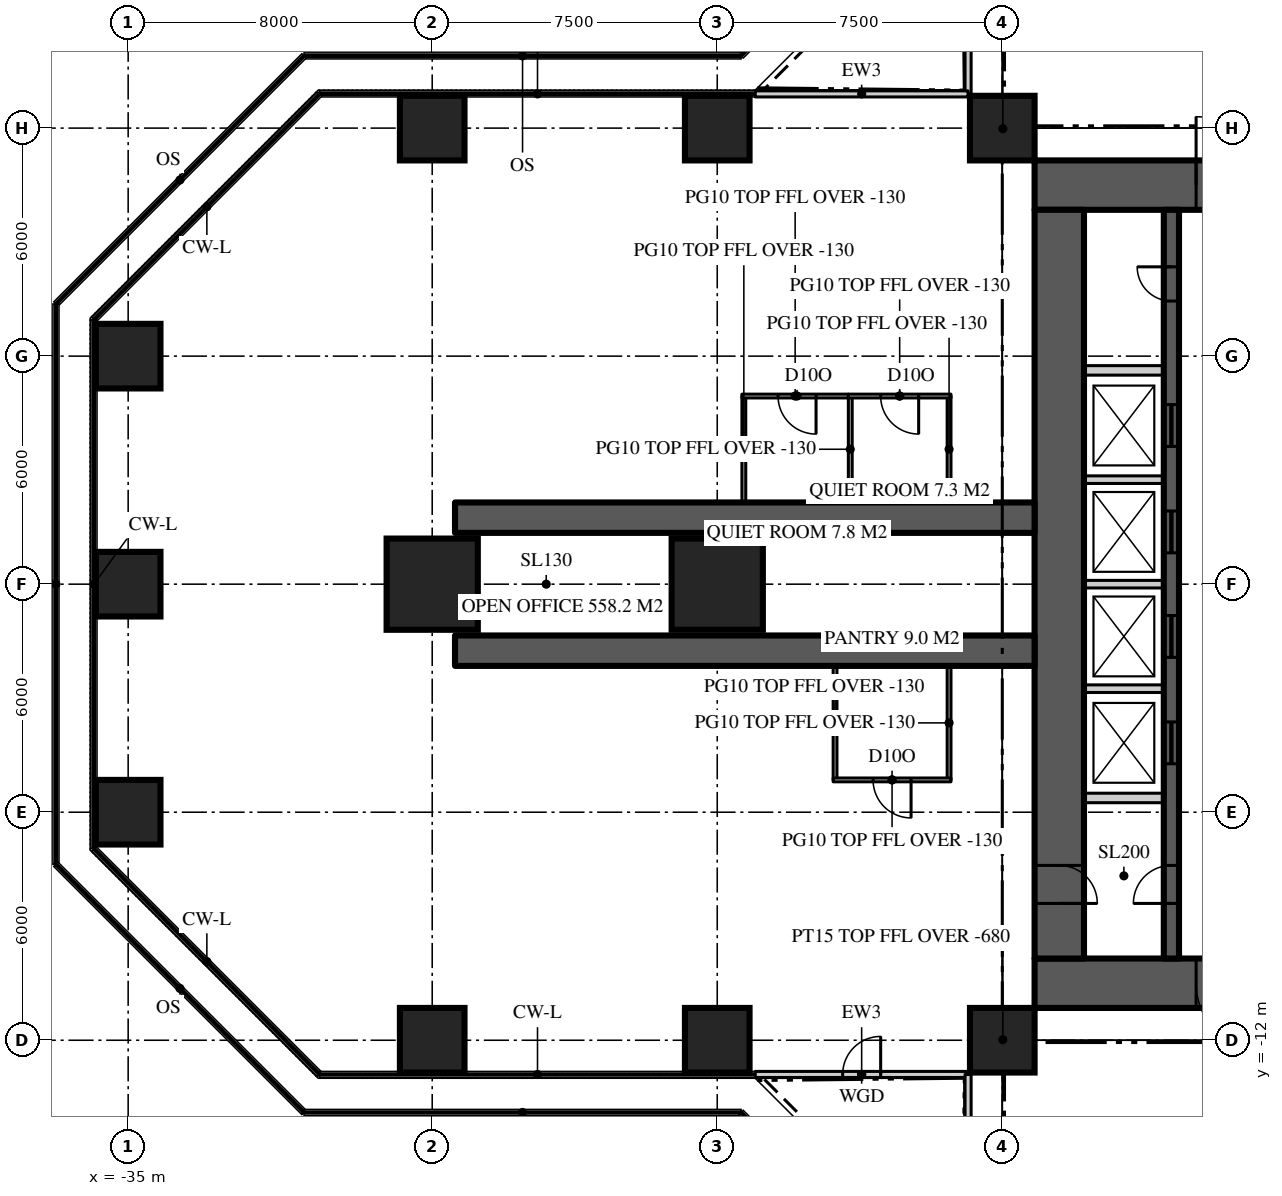
"""IFC4 building model, lengths in metres.
Left out: names, types, materials, properties, quantities, classifications, styles, units other than length and angle.
Written with IfcOpenShell. Run it as: python <this file> out.ifc"""

import sys

from ifc_helpers import new_model, si_unit, direction, frame, frame_2d, origin, origin_2d, place, context, subcontext, project, spatial, rectangle, extrude, element, fill, save


model = new_model("IFC4")
c1 = context("Model", 3, precision=1e-05, world=origin(), true_north=direction((0.0, 1.0)))
c2 = subcontext(c1, "Body", "Model", "MODEL_VIEW")
j1 = project(units=[si_unit("LENGTHUNIT", "METRE"), si_unit("PLANEANGLEUNIT", "RADIAN")], contexts=[c1])
p1 = place(None, origin())
s1 = spatial("IfcSite", under=j1, at=p1, CompositionType="ELEMENT")
p2 = place(p1, origin())
s2 = spatial("IfcBuilding", under=s1, at=p2, CompositionType="ELEMENT")
p3 = place(p2, frame((0.0, 0.0, 98.1)))
s3 = spatial("IfcBuildingStorey", under=s2, at=p3, CompositionType="ELEMENT", Elevation=98.1)
p4 = place(p3, frame((-11.15, 10.5, 0.0), z_axis=(0.0, 0.0, 1.0), x_axis=(1.0, 0.0, 0.0)))
e1 = element("IfcWall", 1, at=p4, inside=s3, PredefinedType="SHEAR", context=c2, shape_type="SweptSolid", body=[
    extrude(rectangle(XDim=22.3, YDim=1.3, at=frame_2d((11.15, 0.0))), origin(), (0.0, 0.0, 1.0), 3.9),
])
p5 = place(p4, frame((4.25, 0.0, 0.0)))
e2 = element("IfcOpeningElement", 2, at=p5, cuts=e1, PredefinedType="OPENING", context=c2, shape_type="SweptSolid", body=[
    extrude(rectangle(XDim=1.8, YDim=2.2, at=frame_2d((0.9, 1.1))), frame((0.0, 0.66, 0.0), z_axis=(0.0, -1.0, 0.0), x_axis=(1.0, 0.0, 0.0)), (0.0, 0.0, 1.0), 1.32),
])
p6 = place(p4, frame((16.25, 0.0, 0.0)))
e3 = element("IfcOpeningElement", 3, at=p6, cuts=e1, PredefinedType="OPENING", context=c2, shape_type="SweptSolid", body=[
    extrude(rectangle(XDim=1.8, YDim=2.2, at=frame_2d((0.9, 1.1))), frame((0.0, 0.66, 0.0), z_axis=(0.0, -1.0, 0.0), x_axis=(1.0, 0.0, 0.0)), (0.0, 0.0, 1.0), 1.32),
])
p7 = place(p3, frame((11.15, -10.5, 0.0), z_axis=(0.0, 0.0, 1.0), x_axis=(-1.0, 0.0, 0.0)))
e4 = element("IfcWall", 4, at=p7, inside=s3, PredefinedType="SHEAR", context=c2, shape_type="SweptSolid", body=[
    extrude(rectangle(XDim=22.3, YDim=1.3, at=frame_2d((11.15, 0.0))), origin(), (0.0, 0.0, 1.0), 3.9),
])
p8 = place(p7, frame((16.25, 0.0, 0.0)))
e5 = element("IfcOpeningElement", 5, at=p8, cuts=e4, PredefinedType="OPENING", context=c2, shape_type="SweptSolid", body=[
    extrude(rectangle(XDim=1.8, YDim=2.2, at=frame_2d((0.9, 1.1))), frame((0.0, 0.66, 0.0), z_axis=(0.0, -1.0, 0.0), x_axis=(1.0, 0.0, 0.0)), (0.0, 0.0, 1.0), 1.32),
])
p9 = place(p7, frame((4.25, 0.0, 0.0)))
e6 = element("IfcOpeningElement", 6, at=p9, cuts=e4, PredefinedType="OPENING", context=c2, shape_type="SweptSolid", body=[
    extrude(rectangle(XDim=1.8, YDim=2.2, at=frame_2d((0.9, 1.1))), frame((0.0, 0.66, 0.0), z_axis=(0.0, -1.0, 0.0), x_axis=(1.0, 0.0, 0.0)), (0.0, 0.0, 1.0), 1.32),
])
p10 = place(p3, frame((-10.5, 9.85, 0.0), z_axis=(0.0, 0.0, 1.0), x_axis=(0.0, -1.0, 0.0)))
e7 = element("IfcWall", 7, at=p10, inside=s3, PredefinedType="SHEAR", context=c2, shape_type="SweptSolid", body=[
    extrude(rectangle(XDim=19.7, YDim=1.3, at=frame_2d((9.85, 0.0))), origin(), (0.0, 0.0, 1.0), 3.9),
])
p11 = place(p10, frame((17.25, 0.0, 0.0)))
e8 = element("IfcOpeningElement", 8, at=p11, cuts=e7, PredefinedType="OPENING", context=c2, shape_type="SweptSolid", body=[
    extrude(rectangle(XDim=1.0, YDim=2.2, at=frame_2d((0.5, 1.1))), frame((0.0, 0.66, 0.0), z_axis=(0.0, -1.0, 0.0), x_axis=(1.0, 0.0, 0.0)), (0.0, 0.0, 1.0), 1.32),
])
for number, where, z_axis, x_axis in (
    (9, (-11.15, 1.75, 0.0), (0.0, 0.0, 1.0), (-1.0, 0.0, 0.0)),
    (10, (-11.15, -1.75, 0.0), (0.0, 0.0, 1.0), (-1.0, 0.0, 0.0)),
):
    element("IfcWall", number, at=place(p3, frame(where, z_axis=z_axis, x_axis=x_axis)), inside=s3, PredefinedType="SHEAR", context=c2, shape_type="SweptSolid", body=[
        extrude(rectangle(XDim=15.25, YDim=0.8, at=frame_2d((7.625, 0.0))), origin(), (0.0, 0.0, 1.0), 3.9),
    ])
for number, where, z_axis, x_axis in (
    (11, (-27.0, -12.0, 0.0), (0.0, 0.0, 1.0), (1.0, 0.0, 0.0)),
    (12, (-19.5, -12.0, 0.0), (0.0, 0.0, 1.0), (1.0, 0.0, 0.0)),
    (13, (-12.0, -12.0, 0.0), (0.0, 0.0, 1.0), (1.0, 0.0, 0.0)),
    (14, (-35.0, -6.0, 0.0), (0.0, 0.0, 1.0), (1.0, 0.0, 0.0)),
    (15, (-35.0, 0.0, 0.0), (0.0, 0.0, 1.0), (1.0, 0.0, 0.0)),
):
    element("IfcColumn", number, at=place(p3, frame(where, z_axis=z_axis, x_axis=x_axis)), inside=s3, PredefinedType="COLUMN", context=c2, shape_type="SweptSolid", body=[
        extrude(rectangle(XDim=1.7, YDim=1.7, at=origin_2d()), origin(), (0.0, 0.0, 1.0), 3.9),
    ])
for number, where, z_axis, x_axis in (
    (16, (-27.0, 0.0, 0.0), (0.0, 0.0, 1.0), (1.0, 0.0, 0.0)),
    (17, (-19.5, 0.0, 0.0), (0.0, 0.0, 1.0), (1.0, 0.0, 0.0)),
):
    element("IfcColumn", number, at=place(p3, frame(where, z_axis=z_axis, x_axis=x_axis)), inside=s3, PredefinedType="COLUMN", context=c2, shape_type="SweptSolid", body=[
        extrude(rectangle(XDim=2.4, YDim=2.4, at=origin_2d()), origin(), (0.0, 0.0, 1.0), 3.9),
    ])
for number, where, z_axis, x_axis in (
    (18, (-35.0, 6.0, 0.0), (0.0, 0.0, 1.0), (1.0, 0.0, 0.0)),
    (19, (-27.0, 12.0, 0.0), (0.0, 0.0, 1.0), (1.0, 0.0, 0.0)),
    (20, (-19.5, 12.0, 0.0), (0.0, 0.0, 1.0), (1.0, 0.0, 0.0)),
    (21, (-12.0, 12.0, 0.0), (0.0, 0.0, 1.0), (1.0, 0.0, 0.0)),
):
    element("IfcColumn", number, at=place(p3, frame(where, z_axis=z_axis, x_axis=x_axis)), inside=s3, PredefinedType="COLUMN", context=c2, shape_type="SweptSolid", body=[
        extrude(rectangle(XDim=1.7, YDim=1.7, at=origin_2d()), origin(), (0.0, 0.0, 1.0), 3.9),
    ])
p12 = place(p3, frame((-12.9, 18.5, 0.0), z_axis=(0.0, 0.0, 1.0), x_axis=(0.0, -1.0, 0.0)))
e22 = element("IfcWall", 22, at=p12, inside=s3, PredefinedType="SOLIDWALL", context=c2, shape_type="SweptSolid", body=[
    extrude(rectangle(XDim=5.6, YDim=0.16, at=frame_2d((2.8, 0.0))), origin(), (0.0, 0.0, 1.0), 3.77),
])
p13 = place(p12, frame((2.3, 0.0, 0.0)))
e23 = element("IfcOpeningElement", 23, at=p13, cuts=e22, PredefinedType="OPENING", context=c2, shape_type="SweptSolid", body=[
    extrude(rectangle(XDim=1.0, YDim=2.2, at=frame_2d((0.5, 1.1))), frame((0.0, 0.09, 0.0), z_axis=(0.0, -1.0, 0.0), x_axis=(1.0, 0.0, 0.0)), (0.0, 0.0, 1.0), 0.18),
])
p14 = place(p3, frame((-12.9, 12.9, 0.0), z_axis=(0.0, 0.0, 1.0), x_axis=(-1.0, 0.0, 0.0)))
e24 = element("IfcWall", 24, at=p14, inside=s3, PredefinedType="SOLIDWALL", context=c2, shape_type="SweptSolid", body=[
    extrude(rectangle(XDim=5.6, YDim=0.16, at=frame_2d((2.8, 0.0))), origin(), (0.0, 0.0, 1.0), 3.77),
])
p15 = place(p3, frame((-18.5, -12.9, 0.0), z_axis=(0.0, 0.0, 1.0), x_axis=(1.0, 0.0, 0.0)))
e25 = element("IfcWall", 25, at=p15, inside=s3, PredefinedType="SOLIDWALL", context=c2, shape_type="SweptSolid", body=[
    extrude(rectangle(XDim=5.6, YDim=0.16, at=frame_2d((2.8, 0.0))), origin(), (0.0, 0.0, 1.0), 3.77),
])
p16 = place(p15, frame((2.3, 0.0, 0.0)))
e26 = element("IfcOpeningElement", 26, at=p16, cuts=e25, PredefinedType="OPENING", context=c2, shape_type="SweptSolid", body=[
    extrude(rectangle(XDim=1.0, YDim=2.2, at=frame_2d((0.5, 1.1))), frame((0.0, 0.09, 0.0), z_axis=(0.0, -1.0, 0.0), x_axis=(1.0, 0.0, 0.0)), (0.0, 0.0, 1.0), 0.18),
])
p17 = place(p3, frame((-12.9, -12.9, 0.0), z_axis=(0.0, 0.0, 1.0), x_axis=(0.0, -1.0, 0.0)))
e27 = element("IfcWall", 27, at=p17, inside=s3, PredefinedType="SOLIDWALL", context=c2, shape_type="SweptSolid", body=[
    extrude(rectangle(XDim=5.6, YDim=0.16, at=frame_2d((2.8, 0.0))), origin(), (0.0, 0.0, 1.0), 3.77),
])
p18 = place(p3, frame((-7.55, -9.85, 0.0), z_axis=(0.0, 0.0, 1.0), x_axis=(0.0, 1.0, 0.0)))
e28 = element("IfcWall", 28, at=p18, inside=s3, PredefinedType="SHEAR", context=c2, shape_type="SweptSolid", body=[
    extrude(rectangle(XDim=19.7, YDim=0.4, at=frame_2d((9.85, 0.0))), origin(), (0.0, 0.0, 1.0), 3.9),
])
p19 = place(p18, frame((1.45, 0.0, 0.0)))
e29 = element("IfcOpeningElement", 29, at=p19, cuts=e28, PredefinedType="OPENING", context=c2, shape_type="SweptSolid", body=[
    extrude(rectangle(XDim=1.0, YDim=2.2, at=frame_2d((0.5, 1.1))), frame((0.0, 0.21, 0.0), z_axis=(0.0, -1.0, 0.0), x_axis=(1.0, 0.0, 0.0)), (0.0, 0.0, 1.0), 0.42),
])
p20 = place(p18, frame((17.3, 0.0, 0.0)))
e30 = element("IfcOpeningElement", 30, at=p20, cuts=e28, PredefinedType="OPENING", context=c2, shape_type="SweptSolid", body=[
    extrude(rectangle(XDim=0.9, YDim=2.1, at=frame_2d((0.45, 1.05))), frame((0.0, 0.21, 0.0), z_axis=(0.0, -1.0, 0.0), x_axis=(1.0, 0.0, 0.0)), (0.0, 0.0, 1.0), 0.42),
])
p21 = place(p18, frame((5.125, 0.0, 0.0)))
e31 = element("IfcOpeningElement", 31, at=p21, cuts=e28, PredefinedType="OPENING", context=c2, shape_type="SweptSolid", body=[
    extrude(rectangle(XDim=1.1, YDim=2.2, at=frame_2d((0.55, 1.1))), frame((0.0, 0.21, 0.0), z_axis=(0.0, -1.0, 0.0), x_axis=(1.0, 0.0, 0.0)), (0.0, 0.0, 1.0), 0.42),
])
p22 = place(p18, frame((7.925, 0.0, 0.0)))
e32 = element("IfcOpeningElement", 32, at=p22, cuts=e28, PredefinedType="OPENING", context=c2, shape_type="SweptSolid", body=[
    extrude(rectangle(XDim=1.1, YDim=2.2, at=frame_2d((0.55, 1.1))), frame((0.0, 0.21, 0.0), z_axis=(0.0, -1.0, 0.0), x_axis=(1.0, 0.0, 0.0)), (0.0, 0.0, 1.0), 0.42),
])
p23 = place(p18, frame((10.675, 0.0, 0.0)))
e33 = element("IfcOpeningElement", 33, at=p23, cuts=e28, PredefinedType="OPENING", context=c2, shape_type="SweptSolid", body=[
    extrude(rectangle(XDim=1.1, YDim=2.2, at=frame_2d((0.55, 1.1))), frame((0.0, 0.21, 0.0), z_axis=(0.0, -1.0, 0.0), x_axis=(1.0, 0.0, 0.0)), (0.0, 0.0, 1.0), 0.42),
])
p24 = place(p18, frame((13.475, 0.0, 0.0)))
e34 = element("IfcOpeningElement", 34, at=p24, cuts=e28, PredefinedType="OPENING", context=c2, shape_type="SweptSolid", body=[
    extrude(rectangle(XDim=1.1, YDim=2.2, at=frame_2d((0.55, 1.1))), frame((0.0, 0.21, 0.0), z_axis=(0.0, -1.0, 0.0), x_axis=(1.0, 0.0, 0.0)), (0.0, 0.0, 1.0), 0.42),
])
for number, where, z_axis, x_axis in (
    (35, (-9.85, 5.625, 0.0), (0.0, 0.0, 1.0), (1.0, 0.0, 0.0)),
    (36, (-9.85, -5.625, 0.0), (0.0, 0.0, 1.0), (1.0, 0.0, 0.0)),
):
    element("IfcWall", number, at=place(p3, frame(where, z_axis=z_axis, x_axis=x_axis)), inside=s3, PredefinedType="SOLIDWALL", context=c2, shape_type="SweptSolid", body=[
        extrude(rectangle(XDim=2.1, YDim=0.25, at=frame_2d((1.05, 0.0))), origin(), (0.0, 0.0, 1.0), 3.7),
    ])
for number, where, z_axis, x_axis in (
    (37, (-9.85, -2.75, 0.0), (0.0, 0.0, 1.0), (1.0, 0.0, 0.0)),
    (38, (-9.85, 0.0, 0.0), (0.0, 0.0, 1.0), (1.0, 0.0, 0.0)),
    (39, (-9.85, 2.75, 0.0), (0.0, 0.0, 1.0), (1.0, 0.0, 0.0)),
):
    element("IfcWall", number, at=place(p3, frame(where, z_axis=z_axis, x_axis=x_axis)), inside=s3, PredefinedType="SOLIDWALL", context=c2, shape_type="SweptSolid", body=[
        extrude(rectangle(XDim=2.1, YDim=0.2, at=frame_2d((1.05, 0.0))), origin(), (0.0, 0.0, 1.0), 3.7),
    ])
for number, where, z_axis, x_axis in (
    (40, (-13.4, -2.15, 0.0), (0.0, 0.0, 1.0), (0.0, -1.0, 0.0)),
    (41, (-16.4, -2.15, 0.0), (0.0, 0.0, 1.0), (0.0, -1.0, 0.0)),
):
    element("IfcWall", number, at=place(p3, frame(where, z_axis=z_axis, x_axis=x_axis)), inside=s3, PredefinedType="PARTITIONING", context=c2, shape_type="SweptSolid", body=[
        extrude(rectangle(XDim=3.0, YDim=0.1, at=frame_2d((1.5, 0.0))), origin(), (0.0, 0.0, 1.0), 3.77),
    ])
p25 = place(p3, frame((-13.35, -5.15, 0.0), z_axis=(0.0, 0.0, 1.0), x_axis=(-1.0, 0.0, 0.0)))
e42 = element("IfcWall", 42, at=p25, inside=s3, PredefinedType="PARTITIONING", context=c2, shape_type="SweptSolid", body=[
    extrude(rectangle(XDim=3.1, YDim=0.1, at=frame_2d((1.55, 0.0))), origin(), (0.0, 0.0, 1.0), 3.77),
])
p26 = place(p25, frame((1.05, 0.0, 0.0)))
e43 = element("IfcOpeningElement", 43, at=p26, cuts=e42, PredefinedType="OPENING", context=c2, shape_type="SweptSolid", body=[
    extrude(rectangle(XDim=1.0, YDim=2.2, at=frame_2d((0.5, 1.1))), frame((0.0, 0.06, 0.0), z_axis=(0.0, -1.0, 0.0), x_axis=(1.0, 0.0, 0.0)), (0.0, 0.0, 1.0), 0.12),
])
for number, where, z_axis, x_axis in (
    (44, (-13.4, 2.15, 0.0), (0.0, 0.0, 1.0), (0.0, 1.0, 0.0)),
    (45, (-16.0, 2.15, 0.0), (0.0, 0.0, 1.0), (0.0, 1.0, 0.0)),
):
    element("IfcWall", number, at=place(p3, frame(where, z_axis=z_axis, x_axis=x_axis)), inside=s3, PredefinedType="PARTITIONING", context=c2, shape_type="SweptSolid", body=[
        extrude(rectangle(XDim=2.8, YDim=0.1, at=frame_2d((1.4, 0.0))), origin(), (0.0, 0.0, 1.0), 3.77),
    ])
p27 = place(p3, frame((-13.35, 4.95, 0.0), z_axis=(0.0, 0.0, 1.0), x_axis=(-1.0, 0.0, 0.0)))
e46 = element("IfcWall", 46, at=p27, inside=s3, PredefinedType="PARTITIONING", context=c2, shape_type="SweptSolid", body=[
    extrude(rectangle(XDim=2.7, YDim=0.1, at=frame_2d((1.35, 0.0))), origin(), (0.0, 0.0, 1.0), 3.77),
])
p28 = place(p27, frame((0.85, 0.0, 0.0)))
e47 = element("IfcOpeningElement", 47, at=p28, cuts=e46, PredefinedType="OPENING", context=c2, shape_type="SweptSolid", body=[
    extrude(rectangle(XDim=1.0, YDim=2.2, at=frame_2d((0.5, 1.1))), frame((0.0, 0.06, 0.0), z_axis=(0.0, -1.0, 0.0), x_axis=(1.0, 0.0, 0.0)), (0.0, 0.0, 1.0), 0.12),
])
p29 = place(p3, frame((-18.8, 2.15, 0.0), z_axis=(0.0, 0.0, 1.0), x_axis=(0.0, 1.0, 0.0)))
e48 = element("IfcWall", 48, at=p29, inside=s3, PredefinedType="PARTITIONING", context=c2, shape_type="SweptSolid", body=[
    extrude(rectangle(XDim=2.8, YDim=0.1, at=frame_2d((1.4, 0.0))), origin(), (0.0, 0.0, 1.0), 3.77),
])
p30 = place(p3, frame((-16.05, 4.95, 0.0), z_axis=(0.0, 0.0, 1.0), x_axis=(-1.0, 0.0, 0.0)))
e49 = element("IfcWall", 49, at=p30, inside=s3, PredefinedType="PARTITIONING", context=c2, shape_type="SweptSolid", body=[
    extrude(rectangle(XDim=2.8, YDim=0.1, at=frame_2d((1.4, 0.0))), origin(), (0.0, 0.0, 1.0), 3.77),
])
p31 = place(p30, frame((0.85, 0.0, 0.0)))
e50 = element("IfcOpeningElement", 50, at=p31, cuts=e49, PredefinedType="OPENING", context=c2, shape_type="SweptSolid", body=[
    extrude(rectangle(XDim=1.0, YDim=2.2, at=frame_2d((0.5, 1.1))), frame((0.0, 0.06, 0.0), z_axis=(0.0, -1.0, 0.0), x_axis=(1.0, 0.0, 0.0)), (0.0, 0.0, 1.0), 0.12),
])
for number, where, z_axis, x_axis in (
    (51, (-11.15, 11.15, 0.0), (0.0, 0.0, 1.0), (-0.707, 0.707, 0.0)),
    (52, (-11.15, -11.15, 0.0), (0.0, 0.0, 1.0), (-0.707, -0.707, 0.0)),
):
    element("IfcWall", number, at=place(p3, frame(where, z_axis=z_axis, x_axis=x_axis)), inside=s3, PredefinedType="PARTITIONING", context=c2, shape_type="SweptSolid", body=[
        extrude(rectangle(XDim=2.362, YDim=0.15, at=frame_2d((1.181, 0.0))), origin(), (0.0, 0.0, 1.0), 3.22),
    ])
p32 = place(p16, origin())
e53 = element("IfcDoor", 53, at=p32, inside=s3, OperationType="SINGLE_SWING_RIGHT", PredefinedType="DOOR", context=c2, shape_type="SweptSolid", body=[
    extrude(rectangle(XDim=1.0, YDim=2.2, at=frame_2d((0.5, 1.1))), frame((0.0, 0.025, 0.0), z_axis=(0.0, -1.0, 0.0), x_axis=(1.0, 0.0, 0.0)), (0.0, 0.0, 1.0), 0.05),
])
fill(e26, e53)
p33 = place(p5, origin())
e54 = element("IfcDoor", 54, at=p33, inside=s3, OperationType="DOUBLE_DOOR_DOUBLE_SWING", PredefinedType="DOOR", context=c2, shape_type="SweptSolid", body=[
    extrude(rectangle(XDim=1.8, YDim=2.2, at=frame_2d((0.9, 1.1))), frame((0.0, 0.025, 0.0), z_axis=(0.0, -1.0, 0.0), x_axis=(1.0, 0.0, 0.0)), (0.0, 0.0, 1.0), 0.05),
])
fill(e2, e54)
p34 = place(p8, origin())
e55 = element("IfcDoor", 55, at=p34, inside=s3, OperationType="DOUBLE_DOOR_DOUBLE_SWING", PredefinedType="DOOR", context=c2, shape_type="SweptSolid", body=[
    extrude(rectangle(XDim=1.8, YDim=2.2, at=frame_2d((0.9, 1.1))), frame((0.0, 0.025, 0.0), z_axis=(0.0, -1.0, 0.0), x_axis=(1.0, 0.0, 0.0)), (0.0, 0.0, 1.0), 0.05),
])
fill(e5, e55)
p35 = place(p19, origin())
e56 = element("IfcDoor", 56, at=p35, inside=s3, OperationType="SINGLE_SWING_LEFT", PredefinedType="DOOR", context=c2, shape_type="SweptSolid", body=[
    extrude(rectangle(XDim=1.0, YDim=2.2, at=frame_2d((0.5, 1.1))), frame((0.0, 0.025, 0.0), z_axis=(0.0, -1.0, 0.0), x_axis=(1.0, 0.0, 0.0)), (0.0, 0.0, 1.0), 0.05),
])
fill(e29, e56)
p36 = place(p11, origin())
e57 = element("IfcDoor", 57, at=p36, inside=s3, OperationType="SINGLE_SWING_RIGHT", PredefinedType="DOOR", context=c2, shape_type="SweptSolid", body=[
    extrude(rectangle(XDim=1.0, YDim=2.2, at=frame_2d((0.5, 1.1))), frame((0.0, 0.025, 0.0), z_axis=(0.0, -1.0, 0.0), x_axis=(1.0, 0.0, 0.0)), (0.0, 0.0, 1.0), 0.05),
])
fill(e8, e57)
p37 = place(p20, origin())
e58 = element("IfcDoor", 58, at=p37, inside=s3, OperationType="SINGLE_SWING_RIGHT", PredefinedType="DOOR", context=c2, shape_type="SweptSolid", body=[
    extrude(rectangle(XDim=0.9, YDim=2.1, at=frame_2d((0.45, 1.05))), frame((0.0, 0.025, 0.0), z_axis=(0.0, -1.0, 0.0), x_axis=(1.0, 0.0, 0.0)), (0.0, 0.0, 1.0), 0.05),
])
fill(e30, e58)
p38 = place(p21, origin())
e59 = element("IfcDoor", 59, at=p38, inside=s3, OperationType="SLIDING_TO_LEFT", PredefinedType="DOOR", context=c2, shape_type="SweptSolid", body=[
    extrude(rectangle(XDim=1.1, YDim=2.2, at=frame_2d((0.55, 1.1))), frame((0.0, 0.025, 0.0), z_axis=(0.0, -1.0, 0.0), x_axis=(1.0, 0.0, 0.0)), (0.0, 0.0, 1.0), 0.05),
])
fill(e31, e59)
p39 = place(p22, origin())
e60 = element("IfcDoor", 60, at=p39, inside=s3, OperationType="SLIDING_TO_LEFT", PredefinedType="DOOR", context=c2, shape_type="SweptSolid", body=[
    extrude(rectangle(XDim=1.1, YDim=2.2, at=frame_2d((0.55, 1.1))), frame((0.0, 0.025, 0.0), z_axis=(0.0, -1.0, 0.0), x_axis=(1.0, 0.0, 0.0)), (0.0, 0.0, 1.0), 0.05),
])
fill(e32, e60)
p40 = place(p23, origin())
e61 = element("IfcDoor", 61, at=p40, inside=s3, OperationType="SLIDING_TO_LEFT", PredefinedType="DOOR", context=c2, shape_type="SweptSolid", body=[
    extrude(rectangle(XDim=1.1, YDim=2.2, at=frame_2d((0.55, 1.1))), frame((0.0, 0.025, 0.0), z_axis=(0.0, -1.0, 0.0), x_axis=(1.0, 0.0, 0.0)), (0.0, 0.0, 1.0), 0.05),
])
fill(e33, e61)
p41 = place(p24, origin())
e62 = element("IfcDoor", 62, at=p41, inside=s3, OperationType="SLIDING_TO_LEFT", PredefinedType="DOOR", context=c2, shape_type="SweptSolid", body=[
    extrude(rectangle(XDim=1.1, YDim=2.2, at=frame_2d((0.55, 1.1))), frame((0.0, 0.025, 0.0), z_axis=(0.0, -1.0, 0.0), x_axis=(1.0, 0.0, 0.0)), (0.0, 0.0, 1.0), 0.05),
])
fill(e34, e62)
p42 = place(p26, origin())
e63 = element("IfcDoor", 63, at=p42, inside=s3, OperationType="SINGLE_SWING_LEFT", PredefinedType="DOOR", context=c2, shape_type="SweptSolid", body=[
    extrude(rectangle(XDim=1.0, YDim=2.2, at=frame_2d((0.5, 1.1))), frame((0.0, 0.025, 0.0), z_axis=(0.0, -1.0, 0.0), x_axis=(1.0, 0.0, 0.0)), (0.0, 0.0, 1.0), 0.05),
])
fill(e43, e63)
p43 = place(p28, origin())
e64 = element("IfcDoor", 64, at=p43, inside=s3, OperationType="SINGLE_SWING_LEFT", PredefinedType="DOOR", context=c2, shape_type="SweptSolid", body=[
    extrude(rectangle(XDim=1.0, YDim=2.2, at=frame_2d((0.5, 1.1))), frame((0.0, 0.025, 0.0), z_axis=(0.0, -1.0, 0.0), x_axis=(1.0, 0.0, 0.0)), (0.0, 0.0, 1.0), 0.05),
])
fill(e47, e64)
p44 = place(p31, origin())
e65 = element("IfcDoor", 65, at=p44, inside=s3, OperationType="SINGLE_SWING_LEFT", PredefinedType="DOOR", context=c2, shape_type="SweptSolid", body=[
    extrude(rectangle(XDim=1.0, YDim=2.2, at=frame_2d((0.5, 1.1))), frame((0.0, 0.025, 0.0), z_axis=(0.0, -1.0, 0.0), x_axis=(1.0, 0.0, 0.0)), (0.0, 0.0, 1.0), 0.05),
])
fill(e50, e65)
save(model, sys.argv[1])
